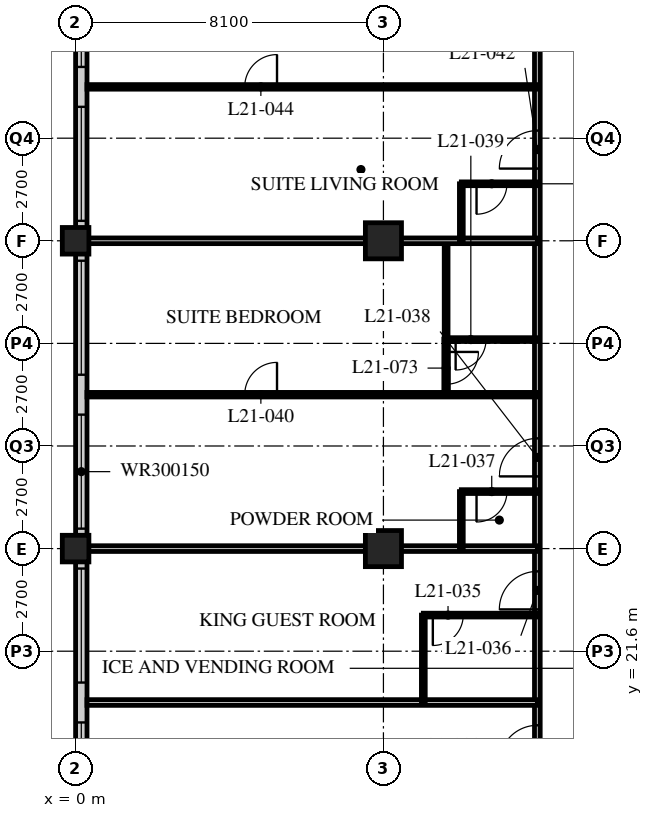
"""IFC4 building model, lengths in metres.
Left out: names, types, materials, properties, quantities, classifications, styles, units other than length and angle.
Written with IfcOpenShell. Run it as: python <this file> out.ifc"""

import sys

from ifc_helpers import new_model, si_unit, direction, frame, frame_2d, origin, origin_2d, place, context, subcontext, project, spatial, rectangle, hollow_rectangle, extrude, element, fill, save


model = new_model("IFC4")
c1 = context("Model", 3, precision=1e-05, world=origin(), true_north=direction((0.0, 1.0)))
c2 = subcontext(c1, "Body", "Model", "MODEL_VIEW")
j1 = project(units=[si_unit("LENGTHUNIT", "METRE"), si_unit("PLANEANGLEUNIT", "RADIAN")], contexts=[c1])
p1 = place(None, origin())
s1 = spatial("IfcSite", under=j1, at=p1, CompositionType="ELEMENT")
p2 = place(p1, origin())
s2 = spatial("IfcBuilding", under=s1, at=p2, CompositionType="ELEMENT")
p3 = place(p2, frame((0.0, 0.0, 84.0)))
s3 = spatial("IfcBuildingStorey", under=s2, at=p3, CompositionType="ELEMENT", Elevation=84.0)
for number, where, z_axis, x_axis in (
    (1, (0.0, 24.3, 0.0), (0.0, 0.0, 1.0), (1.0, 0.0, 0.0)),
    (2, (0.0, 32.4, 0.0), (0.0, 0.0, 1.0), (1.0, 0.0, 0.0)),
):
    element("IfcColumn", number, at=place(p3, frame(where, z_axis=z_axis, x_axis=x_axis)), inside=s3, PredefinedType="COLUMN", context=c2, shape_type="SweptSolid", body=[
        extrude(hollow_rectangle(XDim=0.7, YDim=0.7, WallThickness=0.06, at=origin_2d()), origin(), (0.0, 0.0, 1.0), 3.4),
    ])
for number, where, z_axis, x_axis in (
    (3, (8.1, 24.3, 0.0), (0.0, 0.0, 1.0), (1.0, 0.0, 0.0)),
    (4, (8.1, 32.4, 0.0), (0.0, 0.0, 1.0), (1.0, 0.0, 0.0)),
):
    element("IfcColumn", number, at=place(p3, frame(where, z_axis=z_axis, x_axis=x_axis)), inside=s3, PredefinedType="COLUMN", context=c2, shape_type="SweptSolid", body=[
        extrude(hollow_rectangle(XDim=0.95, YDim=0.95, WallThickness=0.095, at=origin_2d()), origin(), (0.0, 0.0, 1.0), 3.4),
    ])
p4 = place(p3, frame((0.15, 40.2, 0.0), z_axis=(0.0, 0.0, 1.0), x_axis=(0.0, -1.0, 0.0)))
e5 = element("IfcWall", 5, at=p4, inside=s3, PredefinedType="SOLIDWALL", context=c2, shape_type="SweptSolid", body=[
    extrude(rectangle(XDim=32.1, YDim=0.3, at=frame_2d((16.05, 0.0))), origin(), (0.0, 0.0, 1.0), 3.19),
])
p5 = place(p4, frame((0.225, 0.0, 0.9)))
e6 = element("IfcOpeningElement", 6, at=p5, cuts=e5, PredefinedType="OPENING", context=c2, shape_type="SweptSolid", body=[
    extrude(rectangle(XDim=3.0, YDim=1.5, at=frame_2d((1.5, 0.75))), frame((0.0, 0.16, 0.0), z_axis=(0.0, -1.0, 0.0), x_axis=(1.0, 0.0, 0.0)), (0.0, 0.0, 1.0), 0.32),
])
p6 = place(p4, frame((4.275, 0.0, 0.9)))
e7 = element("IfcOpeningElement", 7, at=p6, cuts=e5, PredefinedType="OPENING", context=c2, shape_type="SweptSolid", body=[
    extrude(rectangle(XDim=3.0, YDim=1.5, at=frame_2d((1.5, 0.75))), frame((0.0, 0.16, 0.0), z_axis=(0.0, -1.0, 0.0), x_axis=(1.0, 0.0, 0.0)), (0.0, 0.0, 1.0), 0.32),
])
p7 = place(p4, frame((8.325, 0.0, 0.9)))
e8 = element("IfcOpeningElement", 8, at=p7, cuts=e5, PredefinedType="OPENING", context=c2, shape_type="SweptSolid", body=[
    extrude(rectangle(XDim=3.0, YDim=1.5, at=frame_2d((1.5, 0.75))), frame((0.0, 0.16, 0.0), z_axis=(0.0, -1.0, 0.0), x_axis=(1.0, 0.0, 0.0)), (0.0, 0.0, 1.0), 0.32),
])
p8 = place(p4, frame((12.375, 0.0, 0.9)))
e9 = element("IfcOpeningElement", 9, at=p8, cuts=e5, PredefinedType="OPENING", context=c2, shape_type="SweptSolid", body=[
    extrude(rectangle(XDim=3.0, YDim=1.5, at=frame_2d((1.5, 0.75))), frame((0.0, 0.16, 0.0), z_axis=(0.0, -1.0, 0.0), x_axis=(1.0, 0.0, 0.0)), (0.0, 0.0, 1.0), 0.32),
])
p9 = place(p4, frame((16.425, 0.0, 0.9)))
e10 = element("IfcOpeningElement", 10, at=p9, cuts=e5, PredefinedType="OPENING", context=c2, shape_type="SweptSolid", body=[
    extrude(rectangle(XDim=3.0, YDim=1.5, at=frame_2d((1.5, 0.75))), frame((0.0, 0.16, 0.0), z_axis=(0.0, -1.0, 0.0), x_axis=(1.0, 0.0, 0.0)), (0.0, 0.0, 1.0), 0.32),
])
p10 = place(p4, frame((20.475, 0.0, 0.9)))
e11 = element("IfcOpeningElement", 11, at=p10, cuts=e5, PredefinedType="OPENING", context=c2, shape_type="SweptSolid", body=[
    extrude(rectangle(XDim=3.0, YDim=1.5, at=frame_2d((1.5, 0.75))), frame((0.0, 0.16, 0.0), z_axis=(0.0, -1.0, 0.0), x_axis=(1.0, 0.0, 0.0)), (0.0, 0.0, 1.0), 0.32),
])
p11 = place(p4, frame((24.525, 0.0, 0.9)))
e12 = element("IfcOpeningElement", 12, at=p11, cuts=e5, PredefinedType="OPENING", context=c2, shape_type="SweptSolid", body=[
    extrude(rectangle(XDim=3.0, YDim=1.5, at=frame_2d((1.5, 0.75))), frame((0.0, 0.16, 0.0), z_axis=(0.0, -1.0, 0.0), x_axis=(1.0, 0.0, 0.0)), (0.0, 0.0, 1.0), 0.32),
])
p12 = place(p4, frame((28.575, 0.0, 0.9)))
e13 = element("IfcOpeningElement", 13, at=p12, cuts=e5, PredefinedType="OPENING", context=c2, shape_type="SweptSolid", body=[
    extrude(rectangle(XDim=3.0, YDim=1.5, at=frame_2d((1.5, 0.75))), frame((0.0, 0.16, 0.0), z_axis=(0.0, -1.0, 0.0), x_axis=(1.0, 0.0, 0.0)), (0.0, 0.0, 1.0), 0.32),
])
p13 = place(p3, frame((12.15, 16.2, 0.0), z_axis=(0.0, 0.0, 1.0), x_axis=(0.0, 1.0, 0.0)))
e14 = element("IfcWall", 14, at=p13, inside=s3, PredefinedType="PARTITIONING", context=c2, shape_type="SweptSolid", body=[
    extrude(rectangle(XDim=26.1, YDim=0.15, at=frame_2d((13.05, 0.0))), origin(), (0.0, 0.0, 1.0), 3.19),
])
p14 = place(p13, frame((2.45, 0.0, 0.0)))
e15 = element("IfcOpeningElement", 15, at=p14, cuts=e14, PredefinedType="OPENING", context=c2, shape_type="SweptSolid", body=[
    extrude(rectangle(XDim=1.0, YDim=2.1, at=frame_2d((0.5, 1.05))), frame((0.0, 0.085, 0.0), z_axis=(0.0, -1.0, 0.0), x_axis=(1.0, 0.0, 0.0)), (0.0, 0.0, 1.0), 0.17),
])
p15 = place(p13, frame((6.5, 0.0, 0.0)))
e16 = element("IfcOpeningElement", 16, at=p15, cuts=e14, PredefinedType="OPENING", context=c2, shape_type="SweptSolid", body=[
    extrude(rectangle(XDim=1.0, YDim=2.1, at=frame_2d((0.5, 1.05))), frame((0.0, 0.085, 0.0), z_axis=(0.0, -1.0, 0.0), x_axis=(1.0, 0.0, 0.0)), (0.0, 0.0, 1.0), 0.17),
])
p16 = place(p13, frame((10.0, 0.0, 0.0)))
e17 = element("IfcOpeningElement", 17, at=p16, cuts=e14, PredefinedType="OPENING", context=c2, shape_type="SweptSolid", body=[
    extrude(rectangle(XDim=1.0, YDim=2.1, at=frame_2d((0.5, 1.05))), frame((0.0, 0.085, 0.0), z_axis=(0.0, -1.0, 0.0), x_axis=(1.0, 0.0, 0.0)), (0.0, 0.0, 1.0), 0.17),
])
p17 = place(p13, frame((18.1, 0.0, 0.0)))
e18 = element("IfcOpeningElement", 18, at=p17, cuts=e14, PredefinedType="OPENING", context=c2, shape_type="SweptSolid", body=[
    extrude(rectangle(XDim=1.0, YDim=2.1, at=frame_2d((0.5, 1.05))), frame((0.0, 0.085, 0.0), z_axis=(0.0, -1.0, 0.0), x_axis=(1.0, 0.0, 0.0)), (0.0, 0.0, 1.0), 0.17),
])
p18 = place(p3, frame((12.15, 20.25, 0.0), z_axis=(0.0, 0.0, 1.0), x_axis=(-1.0, 0.0, 0.0)))
e19 = element("IfcWall", 19, at=p18, inside=s3, PredefinedType="PARTITIONING", context=c2, shape_type="SweptSolid", body=[
    extrude(rectangle(XDim=11.85, YDim=0.15, at=frame_2d((5.925, 0.0))), origin(), (0.0, 0.0, 1.0), 3.19),
])
p19 = place(p3, frame((9.15, 20.25, 0.0), z_axis=(0.0, 0.0, 1.0), x_axis=(0.0, 1.0, 0.0)))
e20 = element("IfcWall", 20, at=p19, inside=s3, PredefinedType="PARTITIONING", context=c2, shape_type="SweptSolid", body=[
    extrude(rectangle(XDim=2.3, YDim=0.1, at=frame_2d((1.15, 0.0))), origin(), (0.0, 0.0, 1.0), 3.19),
])
p20 = place(p3, frame((12.15, 22.55, 0.0), z_axis=(0.0, 0.0, 1.0), x_axis=(-1.0, 0.0, 0.0)))
e21 = element("IfcWall", 21, at=p20, inside=s3, PredefinedType="PARTITIONING", context=c2, shape_type="SweptSolid", body=[
    extrude(rectangle(XDim=3.0, YDim=0.1, at=frame_2d((1.5, 0.0))), origin(), (0.0, 0.0, 1.0), 3.19),
])
p21 = place(p20, frame((1.95, 0.0, 0.0)))
e22 = element("IfcOpeningElement", 22, at=p21, cuts=e21, PredefinedType="OPENING", context=c2, shape_type="SweptSolid", body=[
    extrude(rectangle(XDim=0.8, YDim=2.1, at=frame_2d((0.4, 1.05))), frame((0.0, 0.06, 0.0), z_axis=(0.0, -1.0, 0.0), x_axis=(1.0, 0.0, 0.0)), (0.0, 0.0, 1.0), 0.12),
])
p22 = place(p3, frame((12.15, 24.3, 0.0), z_axis=(0.0, 0.0, 1.0), x_axis=(-1.0, 0.0, 0.0)))
e23 = element("IfcWall", 23, at=p22, inside=s3, PredefinedType="PARTITIONING", context=c2, shape_type="SweptSolid", body=[
    extrude(rectangle(XDim=11.85, YDim=0.15, at=frame_2d((5.925, 0.0))), origin(), (0.0, 0.0, 1.0), 2.428),
])
p23 = place(p3, frame((10.15, 24.3, 0.0), z_axis=(0.0, 0.0, 1.0), x_axis=(0.0, 1.0, 0.0)))
e24 = element("IfcWall", 24, at=p23, inside=s3, PredefinedType="PARTITIONING", context=c2, shape_type="SweptSolid", body=[
    extrude(rectangle(XDim=1.5, YDim=0.1, at=frame_2d((0.75, 0.0))), origin(), (0.0, 0.0, 1.0), 3.19),
])
p24 = place(p3, frame((12.15, 25.8, 0.0), z_axis=(0.0, 0.0, 1.0), x_axis=(-1.0, 0.0, 0.0)))
e25 = element("IfcWall", 25, at=p24, inside=s3, PredefinedType="PARTITIONING", context=c2, shape_type="SweptSolid", body=[
    extrude(rectangle(XDim=2.0, YDim=0.1, at=frame_2d((1.0, 0.0))), origin(), (0.0, 0.0, 1.0), 3.19),
])
p25 = place(p24, frame((0.8, 0.0, 0.0)))
e26 = element("IfcOpeningElement", 26, at=p25, cuts=e25, PredefinedType="OPENING", context=c2, shape_type="SweptSolid", body=[
    extrude(rectangle(XDim=0.8, YDim=2.1, at=frame_2d((0.4, 1.05))), frame((0.0, 0.06, 0.0), z_axis=(0.0, -1.0, 0.0), x_axis=(1.0, 0.0, 0.0)), (0.0, 0.0, 1.0), 0.12),
])
p26 = place(p3, frame((9.75, 29.8, 0.0), z_axis=(0.0, 0.0, 1.0), x_axis=(0.0, 1.0, 0.0)))
e27 = element("IfcWall", 27, at=p26, inside=s3, PredefinedType="PARTITIONING", context=c2, shape_type="SweptSolid", body=[
    extrude(rectangle(XDim=2.6, YDim=0.1, at=frame_2d((1.3, 0.0))), origin(), (0.0, 0.0, 1.0), 3.19),
])
p27 = place(p3, frame((12.15, 29.8, 0.0), z_axis=(0.0, 0.0, 1.0), x_axis=(-1.0, 0.0, 0.0)))
e28 = element("IfcWall", 28, at=p27, inside=s3, PredefinedType="PARTITIONING", context=c2, shape_type="SweptSolid", body=[
    extrude(rectangle(XDim=2.4, YDim=0.1, at=frame_2d((1.2, 0.0))), origin(), (0.0, 0.0, 1.0), 3.19),
])
p28 = place(p27, frame((1.35, 0.0, 0.0)))
e29 = element("IfcOpeningElement", 29, at=p28, cuts=e28, PredefinedType="OPENING", context=c2, shape_type="SweptSolid", body=[
    extrude(rectangle(XDim=0.8, YDim=2.1, at=frame_2d((0.4, 1.05))), frame((0.0, 0.06, 0.0), z_axis=(0.0, -1.0, 0.0), x_axis=(1.0, 0.0, 0.0)), (0.0, 0.0, 1.0), 0.12),
])
p29 = place(p3, frame((12.15, 28.35, 0.0), z_axis=(0.0, 0.0, 1.0), x_axis=(-1.0, 0.0, 0.0)))
e30 = element("IfcWall", 30, at=p29, inside=s3, PredefinedType="PARTITIONING", context=c2, shape_type="SweptSolid", body=[
    extrude(rectangle(XDim=11.85, YDim=0.12, at=frame_2d((5.925, 0.0))), origin(), (0.0, 0.0, 1.0), 3.19),
])
p30 = place(p29, frame((6.85, 0.0, 0.0)))
e31 = element("IfcOpeningElement", 31, at=p30, cuts=e30, PredefinedType="OPENING", context=c2, shape_type="SweptSolid", body=[
    extrude(rectangle(XDim=0.85, YDim=2.1, at=frame_2d((0.425, 1.05))), frame((0.0, 0.07, 0.0), z_axis=(0.0, -1.0, 0.0), x_axis=(1.0, 0.0, 0.0)), (0.0, 0.0, 1.0), 0.14),
])
p31 = place(p3, frame((12.15, 32.4, 0.0), z_axis=(0.0, 0.0, 1.0), x_axis=(-1.0, 0.0, 0.0)))
e32 = element("IfcWall", 32, at=p31, inside=s3, PredefinedType="PARTITIONING", context=c2, shape_type="SweptSolid", body=[
    extrude(rectangle(XDim=11.85, YDim=0.15, at=frame_2d((5.925, 0.0))), origin(), (0.0, 0.0, 1.0), 2.428),
])
p32 = place(p3, frame((10.15, 32.4, 0.0), z_axis=(0.0, 0.0, 1.0), x_axis=(0.0, 1.0, 0.0)))
e33 = element("IfcWall", 33, at=p32, inside=s3, PredefinedType="PARTITIONING", context=c2, shape_type="SweptSolid", body=[
    extrude(rectangle(XDim=1.5, YDim=0.1, at=frame_2d((0.75, 0.0))), origin(), (0.0, 0.0, 1.0), 3.19),
])
p33 = place(p3, frame((12.15, 33.9, 0.0), z_axis=(0.0, 0.0, 1.0), x_axis=(-1.0, 0.0, 0.0)))
e34 = element("IfcWall", 34, at=p33, inside=s3, PredefinedType="PARTITIONING", context=c2, shape_type="SweptSolid", body=[
    extrude(rectangle(XDim=2.0, YDim=0.1, at=frame_2d((1.0, 0.0))), origin(), (0.0, 0.0, 1.0), 3.19),
])
p34 = place(p33, frame((0.8, 0.0, 0.0)))
e35 = element("IfcOpeningElement", 35, at=p34, cuts=e34, PredefinedType="OPENING", context=c2, shape_type="SweptSolid", body=[
    extrude(rectangle(XDim=0.8, YDim=2.1, at=frame_2d((0.4, 1.05))), frame((0.0, 0.06, 0.0), z_axis=(0.0, -1.0, 0.0), x_axis=(1.0, 0.0, 0.0)), (0.0, 0.0, 1.0), 0.12),
])
p35 = place(p3, frame((12.15, 36.45, 0.0), z_axis=(0.0, 0.0, 1.0), x_axis=(-1.0, 0.0, 0.0)))
e36 = element("IfcWall", 36, at=p35, inside=s3, PredefinedType="PARTITIONING", context=c2, shape_type="SweptSolid", body=[
    extrude(rectangle(XDim=11.85, YDim=0.12, at=frame_2d((5.925, 0.0))), origin(), (0.0, 0.0, 1.0), 3.19),
])
p36 = place(p35, frame((6.85, 0.0, 0.0)))
e37 = element("IfcOpeningElement", 37, at=p36, cuts=e36, PredefinedType="OPENING", context=c2, shape_type="SweptSolid", body=[
    extrude(rectangle(XDim=0.85, YDim=2.1, at=frame_2d((0.425, 1.05))), frame((0.0, 0.07, 0.0), z_axis=(0.0, -1.0, 0.0), x_axis=(1.0, 0.0, 0.0)), (0.0, 0.0, 1.0), 0.14),
])
p37 = place(p3, frame((9.75, 28.35, 0.0), z_axis=(0.0, 0.0, 1.0), x_axis=(0.0, 1.0, 0.0)))
e38 = element("IfcWall", 38, at=p37, inside=s3, PredefinedType="PARTITIONING", context=c2, shape_type="SweptSolid", body=[
    extrude(rectangle(XDim=1.46, YDim=0.12, at=frame_2d((0.73, 0.0))), origin(), (0.0, 0.0, 1.0), 3.19),
])
p38 = place(p37, frame((0.275, 0.0, 0.0)))
e39 = element("IfcOpeningElement", 39, at=p38, cuts=e38, PredefinedType="OPENING", context=c2, shape_type="SweptSolid", body=[
    extrude(rectangle(XDim=0.85, YDim=2.1, at=frame_2d((0.425, 1.05))), frame((0.0, 0.07, 0.0), z_axis=(0.0, -1.0, 0.0), x_axis=(1.0, 0.0, 0.0)), (0.0, 0.0, 1.0), 0.14),
])
p39 = place(p5, origin())
e40 = element("IfcWindow", 40, at=p39, inside=s3, PartitioningType="SINGLE_PANEL", PredefinedType="WINDOW", context=c2, shape_type="SweptSolid", body=[
    extrude(rectangle(XDim=3.0, YDim=1.5, at=frame_2d((1.5, 0.75))), frame((0.0, 0.03, 0.0), z_axis=(0.0, -1.0, 0.0), x_axis=(1.0, 0.0, 0.0)), (0.0, 0.0, 1.0), 0.06),
])
fill(e6, e40)
p40 = place(p6, origin())
e41 = element("IfcWindow", 41, at=p40, inside=s3, PartitioningType="SINGLE_PANEL", PredefinedType="WINDOW", context=c2, shape_type="SweptSolid", body=[
    extrude(rectangle(XDim=3.0, YDim=1.5, at=frame_2d((1.5, 0.75))), frame((0.0, 0.03, 0.0), z_axis=(0.0, -1.0, 0.0), x_axis=(1.0, 0.0, 0.0)), (0.0, 0.0, 1.0), 0.06),
])
fill(e7, e41)
p41 = place(p7, origin())
e42 = element("IfcWindow", 42, at=p41, inside=s3, PartitioningType="SINGLE_PANEL", PredefinedType="WINDOW", context=c2, shape_type="SweptSolid", body=[
    extrude(rectangle(XDim=3.0, YDim=1.5, at=frame_2d((1.5, 0.75))), frame((0.0, 0.03, 0.0), z_axis=(0.0, -1.0, 0.0), x_axis=(1.0, 0.0, 0.0)), (0.0, 0.0, 1.0), 0.06),
])
fill(e8, e42)
p42 = place(p8, origin())
e43 = element("IfcWindow", 43, at=p42, inside=s3, PartitioningType="SINGLE_PANEL", PredefinedType="WINDOW", context=c2, shape_type="SweptSolid", body=[
    extrude(rectangle(XDim=3.0, YDim=1.5, at=frame_2d((1.5, 0.75))), frame((0.0, 0.03, 0.0), z_axis=(0.0, -1.0, 0.0), x_axis=(1.0, 0.0, 0.0)), (0.0, 0.0, 1.0), 0.06),
])
fill(e9, e43)
p43 = place(p9, origin())
e44 = element("IfcWindow", 44, at=p43, inside=s3, PartitioningType="SINGLE_PANEL", PredefinedType="WINDOW", context=c2, shape_type="SweptSolid", body=[
    extrude(rectangle(XDim=3.0, YDim=1.5, at=frame_2d((1.5, 0.75))), frame((0.0, 0.03, 0.0), z_axis=(0.0, -1.0, 0.0), x_axis=(1.0, 0.0, 0.0)), (0.0, 0.0, 1.0), 0.06),
])
fill(e10, e44)
p44 = place(p10, origin())
e45 = element("IfcWindow", 45, at=p44, inside=s3, PartitioningType="SINGLE_PANEL", PredefinedType="WINDOW", context=c2, shape_type="SweptSolid", body=[
    extrude(rectangle(XDim=3.0, YDim=1.5, at=frame_2d((1.5, 0.75))), frame((0.0, 0.03, 0.0), z_axis=(0.0, -1.0, 0.0), x_axis=(1.0, 0.0, 0.0)), (0.0, 0.0, 1.0), 0.06),
])
fill(e11, e45)
p45 = place(p14, origin())
e46 = element("IfcDoor", 46, at=p45, inside=s3, OperationType="SINGLE_SWING_LEFT", PredefinedType="DOOR", context=c2, shape_type="SweptSolid", body=[
    extrude(rectangle(XDim=1.0, YDim=2.1, at=frame_2d((0.5, 1.05))), frame((0.0, 0.025, 0.0), z_axis=(0.0, -1.0, 0.0), x_axis=(1.0, 0.0, 0.0)), (0.0, 0.0, 1.0), 0.05),
])
fill(e15, e46)
p46 = place(p21, origin())
e47 = element("IfcDoor", 47, at=p46, inside=s3, OperationType="SINGLE_SWING_RIGHT", PredefinedType="DOOR", context=c2, shape_type="SweptSolid", body=[
    extrude(rectangle(XDim=0.8, YDim=2.1, at=frame_2d((0.4, 1.05))), frame((0.0, 0.025, 0.0), z_axis=(0.0, -1.0, 0.0), x_axis=(1.0, 0.0, 0.0)), (0.0, 0.0, 1.0), 0.05),
])
fill(e22, e47)
p47 = place(p15, origin())
e48 = element("IfcDoor", 48, at=p47, inside=s3, OperationType="SINGLE_SWING_LEFT", PredefinedType="DOOR", context=c2, shape_type="SweptSolid", body=[
    extrude(rectangle(XDim=1.0, YDim=2.1, at=frame_2d((0.5, 1.05))), frame((0.0, 0.025, 0.0), z_axis=(0.0, -1.0, 0.0), x_axis=(1.0, 0.0, 0.0)), (0.0, 0.0, 1.0), 0.05),
])
fill(e16, e48)
p48 = place(p25, origin())
e49 = element("IfcDoor", 49, at=p48, inside=s3, OperationType="SINGLE_SWING_RIGHT", PredefinedType="DOOR", context=c2, shape_type="SweptSolid", body=[
    extrude(rectangle(XDim=0.8, YDim=2.1, at=frame_2d((0.4, 1.05))), frame((0.0, 0.025, 0.0), z_axis=(0.0, -1.0, 0.0), x_axis=(1.0, 0.0, 0.0)), (0.0, 0.0, 1.0), 0.05),
])
fill(e26, e49)
p49 = place(p16, origin())
e50 = element("IfcDoor", 50, at=p49, inside=s3, OperationType="SINGLE_SWING_LEFT", PredefinedType="DOOR", context=c2, shape_type="SweptSolid", body=[
    extrude(rectangle(XDim=1.0, YDim=2.1, at=frame_2d((0.5, 1.05))), frame((0.0, 0.025, 0.0), z_axis=(0.0, -1.0, 0.0), x_axis=(1.0, 0.0, 0.0)), (0.0, 0.0, 1.0), 0.05),
])
fill(e17, e50)
p50 = place(p28, origin())
e51 = element("IfcDoor", 51, at=p50, inside=s3, OperationType="SINGLE_SWING_RIGHT", PredefinedType="DOOR", context=c2, shape_type="SweptSolid", body=[
    extrude(rectangle(XDim=0.8, YDim=2.1, at=frame_2d((0.4, 1.05))), frame((0.0, 0.025, 0.0), z_axis=(0.0, -1.0, 0.0), x_axis=(1.0, 0.0, 0.0)), (0.0, 0.0, 1.0), 0.05),
])
fill(e29, e51)
p51 = place(p30, origin())
e52 = element("IfcDoor", 52, at=p51, inside=s3, OperationType="SINGLE_SWING_RIGHT", PredefinedType="DOOR", context=c2, shape_type="SweptSolid", body=[
    extrude(rectangle(XDim=0.85, YDim=2.1, at=frame_2d((0.425, 1.05))), frame((0.0, 0.025, 0.0), z_axis=(0.0, -1.0, 0.0), x_axis=(1.0, 0.0, 0.0)), (0.0, 0.0, 1.0), 0.05),
])
fill(e31, e52)
p52 = place(p34, origin())
e53 = element("IfcDoor", 53, at=p52, inside=s3, OperationType="SINGLE_SWING_RIGHT", PredefinedType="DOOR", context=c2, shape_type="SweptSolid", body=[
    extrude(rectangle(XDim=0.8, YDim=2.1, at=frame_2d((0.4, 1.05))), frame((0.0, 0.025, 0.0), z_axis=(0.0, -1.0, 0.0), x_axis=(1.0, 0.0, 0.0)), (0.0, 0.0, 1.0), 0.05),
])
fill(e35, e53)
p53 = place(p17, origin())
e54 = element("IfcDoor", 54, at=p53, inside=s3, OperationType="SINGLE_SWING_LEFT", PredefinedType="DOOR", context=c2, shape_type="SweptSolid", body=[
    extrude(rectangle(XDim=1.0, YDim=2.1, at=frame_2d((0.5, 1.05))), frame((0.0, 0.025, 0.0), z_axis=(0.0, -1.0, 0.0), x_axis=(1.0, 0.0, 0.0)), (0.0, 0.0, 1.0), 0.05),
])
fill(e18, e54)
p54 = place(p36, origin())
e55 = element("IfcDoor", 55, at=p54, inside=s3, OperationType="SINGLE_SWING_RIGHT", PredefinedType="DOOR", context=c2, shape_type="SweptSolid", body=[
    extrude(rectangle(XDim=0.85, YDim=2.1, at=frame_2d((0.425, 1.05))), frame((0.0, 0.025, 0.0), z_axis=(0.0, -1.0, 0.0), x_axis=(1.0, 0.0, 0.0)), (0.0, 0.0, 1.0), 0.05),
])
fill(e37, e55)
p55 = place(p38, origin())
e56 = element("IfcDoor", 56, at=p55, inside=s3, OperationType="SINGLE_SWING_LEFT", PredefinedType="DOOR", context=c2, shape_type="SweptSolid", body=[
    extrude(rectangle(XDim=0.85, YDim=2.1, at=frame_2d((0.425, 1.05))), frame((0.0, 0.025, 0.0), z_axis=(0.0, -1.0, 0.0), x_axis=(1.0, 0.0, 0.0)), (0.0, 0.0, 1.0), 0.05),
])
fill(e39, e56)
save(model, sys.argv[1])
